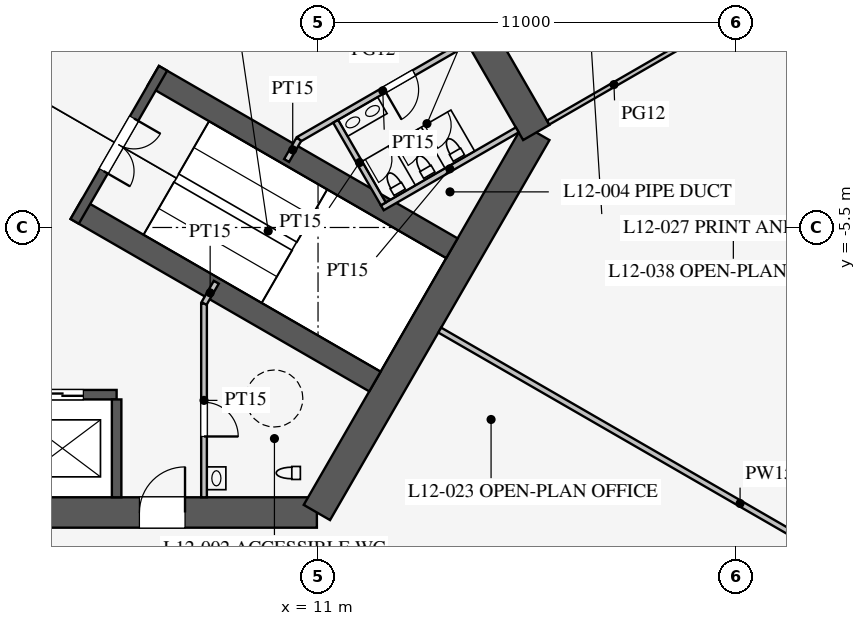
"""IFC4 building model, lengths in metres.
Left out: names, types, materials, properties, quantities, classifications, styles, units other than length and angle.
Written with IfcOpenShell. Run it as: python <this file> out.ifc"""

import sys

from ifc_helpers import new_model, si_unit, direction, frame, frame_2d, origin, place, context, subcontext, project, spatial, rectangle, extrude, element, fill, save


model = new_model("IFC4")
c1 = context("Model", 3, precision=1e-05, world=origin(), true_north=direction((0.0, 1.0)))
c2 = subcontext(c1, "Body", "Model", "MODEL_VIEW")
j1 = project(units=[si_unit("LENGTHUNIT", "METRE"), si_unit("PLANEANGLEUNIT", "RADIAN")], contexts=[c1])
p1 = place(None, origin())
s1 = spatial("IfcSite", under=j1, at=p1, CompositionType="ELEMENT")
p2 = place(p1, origin())
s2 = spatial("IfcBuilding", under=s1, at=p2, CompositionType="ELEMENT")
p3 = place(p2, frame((0.0, 0.0, 54.3)))
s3 = spatial("IfcBuildingStorey", under=s2, at=p3, CompositionType="ELEMENT", Elevation=54.3)
p4 = place(p3, frame((-10.97, -13.0, 0.0), z_axis=(0.0, 0.0, 1.0), x_axis=(1.0, 0.0, 0.0)))
e1 = element("IfcWall", 1, at=p4, inside=s3, PredefinedType="SHEAR", context=c2, shape_type="SweptSolid", body=[
    extrude(rectangle(XDim=21.939, YDim=0.8, at=frame_2d((10.97, 0.0))), origin(), (0.0, 0.0, 1.0), 4.2),
])
p5 = place(p4, frame((17.27, 0.0, 0.0)))
e2 = element("IfcOpeningElement", 2, at=p5, cuts=e1, PredefinedType="OPENING", context=c2, shape_type="SweptSolid", body=[
    extrude(rectangle(XDim=1.2, YDim=2.1, at=frame_2d((0.6, 1.05))), frame((0.0, 0.41, 0.0), z_axis=(0.0, -1.0, 0.0), x_axis=(1.0, 0.0, 0.0)), (0.0, 0.0, 1.0), 0.82),
])
p6 = place(p4, frame((3.47, 0.0, 0.0)))
e3 = element("IfcOpeningElement", 3, at=p6, cuts=e1, PredefinedType="OPENING", context=c2, shape_type="SweptSolid", body=[
    extrude(rectangle(XDim=1.2, YDim=2.1, at=frame_2d((0.6, 1.05))), frame((0.0, 0.41, 0.0), z_axis=(0.0, -1.0, 0.0), x_axis=(1.0, 0.0, 0.0)), (0.0, 0.0, 1.0), 0.82),
])
p7 = place(p3, frame((10.97, -13.0, 0.0), z_axis=(0.0, 0.0, 1.0), x_axis=(0.499995765644, 0.866027848477, 0.0)))
e4 = element("IfcWall", 4, at=p7, inside=s3, PredefinedType="SHEAR", context=c2, shape_type="SweptSolid", body=[
    extrude(rectangle(XDim=11.547, YDim=0.8, at=frame_2d((5.773, 0.0))), origin(), (0.0, 0.0, 1.0), 4.2),
])
p8 = place(p3, frame((16.743, -3.0, 0.0), z_axis=(0.0, 0.0, 1.0), x_axis=(-0.500002442456, 0.866023993627, 0.0)))
e5 = element("IfcWall", 5, at=p8, inside=s3, PredefinedType="SHEAR", context=c2, shape_type="SweptSolid", body=[
    extrude(rectangle(XDim=21.939, YDim=0.8, at=frame_2d((10.97, 0.0))), origin(), (0.0, 0.0, 1.0), 4.2),
])
p9 = place(p8, frame((17.27, 0.0, 0.0)))
e6 = element("IfcOpeningElement", 6, at=p9, cuts=e5, PredefinedType="OPENING", context=c2, shape_type="SweptSolid", body=[
    extrude(rectangle(XDim=1.2, YDim=2.1, at=frame_2d((0.6, 1.05))), frame((0.0, 0.41, 0.0), z_axis=(0.0, -1.0, 0.0), x_axis=(1.0, 0.0, 0.0)), (0.0, 0.0, 1.0), 0.82),
])
p10 = place(p8, frame((3.47, 0.0, 0.0)))
e7 = element("IfcOpeningElement", 7, at=p10, cuts=e5, PredefinedType="OPENING", context=c2, shape_type="SweptSolid", body=[
    extrude(rectangle(XDim=1.2, YDim=2.1, at=frame_2d((0.6, 1.05))), frame((0.0, 0.41, 0.0), z_axis=(0.0, -1.0, 0.0), x_axis=(1.0, 0.0, 0.0)), (0.0, 0.0, 1.0), 0.82),
])
p11 = place(p3, frame((-5.7, -9.9, 0.0), z_axis=(0.0, 0.0, 1.0), x_axis=(1.0, 0.0, 0.0)))
e8 = element("IfcWall", 8, at=p11, inside=s3, PredefinedType="SHEAR", context=c2, shape_type="SweptSolid", body=[
    extrude(rectangle(XDim=11.4, YDim=0.25, at=frame_2d((5.7, 0.0))), origin(), (0.0, 0.0, 1.0), 4.2),
])
p12 = place(p11, frame((0.875, 0.0, 0.0)))
e9 = element("IfcOpeningElement", 9, at=p12, cuts=e8, PredefinedType="OPENING", context=c2, shape_type="SweptSolid", body=[
    extrude(rectangle(XDim=1.1, YDim=2.2, at=frame_2d((0.55, 1.1))), frame((0.0, 0.135, 0.0), z_axis=(0.0, -1.0, 0.0), x_axis=(1.0, 0.0, 0.0)), (0.0, 0.0, 1.0), 0.27),
])
p13 = place(p11, frame((3.725, 0.0, 0.0)))
e10 = element("IfcOpeningElement", 10, at=p13, cuts=e8, PredefinedType="OPENING", context=c2, shape_type="SweptSolid", body=[
    extrude(rectangle(XDim=1.1, YDim=2.2, at=frame_2d((0.55, 1.1))), frame((0.0, 0.135, 0.0), z_axis=(0.0, -1.0, 0.0), x_axis=(1.0, 0.0, 0.0)), (0.0, 0.0, 1.0), 0.27),
])
p14 = place(p11, frame((6.575, 0.0, 0.0)))
e11 = element("IfcOpeningElement", 11, at=p14, cuts=e8, PredefinedType="OPENING", context=c2, shape_type="SweptSolid", body=[
    extrude(rectangle(XDim=1.1, YDim=2.2, at=frame_2d((0.55, 1.1))), frame((0.0, 0.135, 0.0), z_axis=(0.0, -1.0, 0.0), x_axis=(1.0, 0.0, 0.0)), (0.0, 0.0, 1.0), 0.27),
])
p15 = place(p11, frame((9.425, 0.0, 0.0)))
e12 = element("IfcOpeningElement", 12, at=p15, cuts=e8, PredefinedType="OPENING", context=c2, shape_type="SweptSolid", body=[
    extrude(rectangle(XDim=1.1, YDim=2.2, at=frame_2d((0.55, 1.1))), frame((0.0, 0.135, 0.0), z_axis=(0.0, -1.0, 0.0), x_axis=(1.0, 0.0, 0.0)), (0.0, 0.0, 1.0), 0.27),
])
p16 = place(p3, frame((5.7, -10.025, 0.0), z_axis=(0.0, 0.0, 1.0), x_axis=(0.0, -1.0, 0.0)))
e13 = element("IfcWall", 13, at=p16, inside=s3, PredefinedType="SHEAR", context=c2, shape_type="SweptSolid", body=[
    extrude(rectangle(XDim=2.575, YDim=0.25, at=frame_2d((1.288, 0.0))), origin(), (0.0, 0.0, 1.0), 4.2),
])
for number, where, z_axis, x_axis in (
    (14, (4.638, -5.016, 0.0), (0.0, 0.0, 1.0), (0.866, -0.5, 0.0)),
    (15, (6.663, -1.509, 0.0), (0.0, 0.0, 1.0), (0.866, -0.5, 0.0)),
):
    element("IfcWall", number, at=place(p3, frame(where, z_axis=z_axis, x_axis=x_axis)), inside=s3, PredefinedType="SHEAR", context=c2, shape_type="SweptSolid", body=[
        extrude(rectangle(XDim=9.075, YDim=0.6, at=frame_2d((4.538, 0.0))), origin(), (0.0, 0.0, 1.0), 4.2),
    ])
p17 = place(p3, frame((4.597, -5.339, 0.0), z_axis=(0.0, 0.0, 1.0), x_axis=(0.499984536904, 0.866034331223, 0.0)))
e16 = element("IfcWall", 16, at=p17, inside=s3, PredefinedType="SHEAR", context=c2, shape_type="SweptSolid", body=[
    extrude(rectangle(XDim=4.65, YDim=0.25, at=frame_2d((2.325, 0.0))), origin(), (0.0, 0.0, 1.0), 4.2),
])
p18 = place(p17, frame((1.525, 0.0, 0.0)))
e17 = element("IfcOpeningElement", 17, at=p18, cuts=e16, PredefinedType="OPENING", context=c2, shape_type="SweptSolid", body=[
    extrude(rectangle(XDim=1.6, YDim=2.1, at=frame_2d((0.8, 1.05))), frame((0.0, 0.135, 0.0), z_axis=(0.0, -1.0, 0.0), x_axis=(1.0, 0.0, 0.0)), (0.0, 0.0, 1.0), 0.27),
])
p19 = place(p3, frame((8.0, -7.5, 0.0), z_axis=(0.0, 0.0, 1.0), x_axis=(0.0, -1.0, 0.0)))
e18 = element("IfcWall", 18, at=p19, inside=s3, PredefinedType="PARTITIONING", context=c2, shape_type="SweptSolid", body=[
    extrude(rectangle(XDim=5.1, YDim=0.15, at=frame_2d((2.55, 0.0))), origin(), (0.0, 0.0, 1.0), 4.0),
])
p20 = place(p19, frame((2.6, 0.0, 0.0)))
e19 = element("IfcOpeningElement", 19, at=p20, cuts=e18, PredefinedType="OPENING", context=c2, shape_type="SweptSolid", body=[
    extrude(rectangle(XDim=0.9, YDim=2.1, at=frame_2d((0.45, 1.05))), frame((0.0, 0.085, 0.0), z_axis=(0.0, -1.0, 0.0), x_axis=(1.0, 0.0, 0.0)), (0.0, 0.0, 1.0), 0.17),
])
p21 = place(p3, frame((10.495, -3.178, 0.0), z_axis=(0.0, 0.0, 1.0), x_axis=(0.86602216432, 0.500005610874, 0.0)))
e20 = element("IfcWall", 20, at=p21, inside=s3, PredefinedType="PARTITIONING", context=c2, shape_type="SweptSolid", body=[
    extrude(rectangle(XDim=5.1, YDim=0.15, at=frame_2d((2.55, 0.0))), origin(), (0.0, 0.0, 1.0), 4.0),
])
p22 = place(p21, frame((2.6, 0.0, 0.0)))
e21 = element("IfcOpeningElement", 21, at=p22, cuts=e20, PredefinedType="OPENING", context=c2, shape_type="SweptSolid", body=[
    extrude(rectangle(XDim=0.9, YDim=2.1, at=frame_2d((0.45, 1.05))), frame((0.0, 0.085, 0.0), z_axis=(0.0, -1.0, 0.0), x_axis=(1.0, 0.0, 0.0)), (0.0, 0.0, 1.0), 0.17),
])
for number, where, z_axis, x_axis in (
    (22, (8.0, -7.5, 0.0), (0.0, 0.0, 1.0), (0.5, 0.866, 0.0)),
    (23, (10.495, -3.178, 0.0), (0.0, 0.0, 1.0), (-0.5, -0.866, 0.0)),
):
    element("IfcWall", number, at=place(p3, frame(where, z_axis=z_axis, x_axis=x_axis)), inside=s3, PredefinedType="PARTITIONING", context=c2, shape_type="SweptSolid", body=[
        extrude(rectangle(XDim=0.645, YDim=0.15, at=frame_2d((0.323, 0.0))), origin(), (0.0, 0.0, 1.0), 4.0),
    ])
p23 = place(p3, frame((12.691, -4.982, 0.0), z_axis=(0.0, 0.0, 1.0), x_axis=(0.8660249478, 0.500000789788, 0.0)))
e24 = element("IfcWall", 24, at=p23, inside=s3, PredefinedType="PARTITIONING", context=c2, shape_type="SweptSolid", body=[
    extrude(rectangle(XDim=4.1, YDim=0.15, at=frame_2d((2.05, 0.0))), origin(), (0.0, 0.0, 1.0), 4.0),
])
p24 = place(p3, frame((11.464, -2.706, 0.0), z_axis=(0.0, 0.0, 1.0), x_axis=(0.50001992892, -0.866013897511, 0.0)))
e25 = element("IfcWall", 25, at=p24, inside=s3, PredefinedType="PARTITIONING", context=c2, shape_type="SweptSolid", body=[
    extrude(rectangle(XDim=2.51, YDim=0.15, at=frame_2d((1.255, 0.0))), origin(), (0.0, 0.0, 1.0), 4.0),
])
p25 = place(p3, frame((14.203, -8.2, 0.0), z_axis=(0.0, 0.0, 1.0), x_axis=(0.866024965723, -0.500000758745, 0.0)))
e26 = element("IfcWall", 26, at=p25, inside=s3, PredefinedType="PARTITIONING", context=c2, shape_type="SweptSolid", body=[
    extrude(rectangle(XDim=18.25, YDim=0.15, at=frame_2d((9.125, 0.0))), origin(), (0.0, 0.0, 1.0), 2.3),
])
p26 = place(p3, frame((17.055, -2.74, 0.0), z_axis=(0.0, 0.0, 1.0), x_axis=(0.866026010844, 0.49999894854, 0.0)))
e27 = element("IfcWall", 27, at=p26, inside=s3, PredefinedType="PARTITIONING", context=c2, shape_type="SweptSolid", body=[
    extrude(rectangle(XDim=4.0, YDim=0.12, at=frame_2d((2.0, 0.0))), origin(), (0.0, 0.0, 1.0), 2.9),
])
p27 = place(p20, origin())
e28 = element("IfcDoor", 28, at=p27, inside=s3, OperationType="SINGLE_SWING_RIGHT", PredefinedType="DOOR", context=c2, shape_type="SweptSolid", body=[
    extrude(rectangle(XDim=0.9, YDim=2.1, at=frame_2d((0.45, 1.05))), frame((0.0, 0.025, 0.0), z_axis=(0.0, -1.0, 0.0), x_axis=(1.0, 0.0, 0.0)), (0.0, 0.0, 1.0), 0.05),
])
fill(e19, e28)
p28 = place(p22, frame((0.9, 0.0, 0.0), z_axis=(0.0, 0.0, 1.0), x_axis=(-1.0, 0.0, 0.0)))
e29 = element("IfcDoor", 29, at=p28, inside=s3, OperationType="SINGLE_SWING_RIGHT", PredefinedType="DOOR", context=c2, shape_type="SweptSolid", body=[
    extrude(rectangle(XDim=0.9, YDim=2.1, at=frame_2d((0.45, 1.05))), frame((0.0, 0.025, 0.0), z_axis=(0.0, -1.0, 0.0), x_axis=(1.0, 0.0, 0.0)), (0.0, 0.0, 1.0), 0.05),
])
fill(e21, e29)
p29 = place(p18, frame((1.6, 0.0, 0.0), z_axis=(0.0, 0.0, 1.0), x_axis=(-1.0, 0.0, 0.0)))
e30 = element("IfcDoor", 30, at=p29, inside=s3, OperationType="DOUBLE_DOOR_SINGLE_SWING", PredefinedType="DOOR", context=c2, shape_type="SweptSolid", body=[
    extrude(rectangle(XDim=1.6, YDim=2.1, at=frame_2d((0.8, 1.05))), frame((0.0, 0.025, 0.0), z_axis=(0.0, -1.0, 0.0), x_axis=(1.0, 0.0, 0.0)), (0.0, 0.0, 1.0), 0.05),
])
fill(e17, e30)
p30 = place(p5, origin())
e31 = element("IfcDoor", 31, at=p30, inside=s3, OperationType="SINGLE_SWING_RIGHT", PredefinedType="DOOR", context=c2, shape_type="SweptSolid", body=[
    extrude(rectangle(XDim=1.2, YDim=2.1, at=frame_2d((0.6, 1.05))), frame((0.0, 0.025, 0.0), z_axis=(0.0, -1.0, 0.0), x_axis=(1.0, 0.0, 0.0)), (0.0, 0.0, 1.0), 0.05),
])
fill(e2, e31)
p31 = place(p15, origin())
e32 = element("IfcDoor", 32, at=p31, inside=s3, OperationType="DOUBLE_DOOR_SLIDING", PredefinedType="DOOR", context=c2, shape_type="SweptSolid", body=[
    extrude(rectangle(XDim=1.1, YDim=2.2, at=frame_2d((0.55, 1.1))), frame((0.0, 0.025, 0.0), z_axis=(0.0, -1.0, 0.0), x_axis=(1.0, 0.0, 0.0)), (0.0, 0.0, 1.0), 0.05),
])
fill(e12, e32)
save(model, sys.argv[1])
